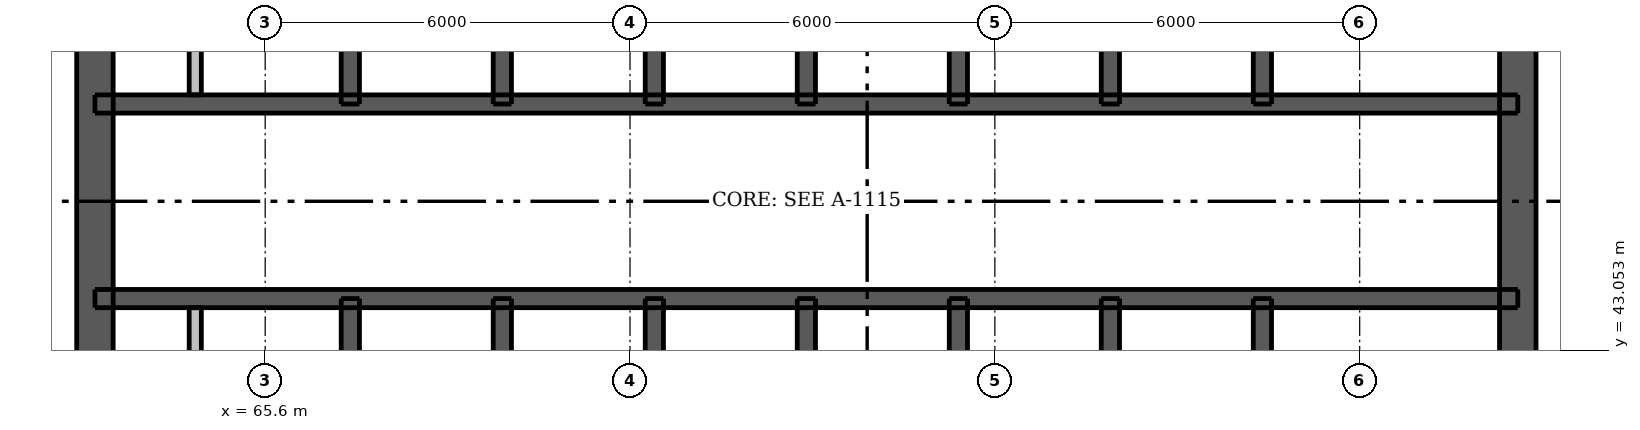
"""IFC4 building model, lengths in metres.
Left out: names, types, materials, properties, quantities, classifications, styles, units other than length and angle.
Written with IfcOpenShell. Run it as: python <this file> out.ifc"""

import sys

from ifc_helpers import new_model, si_unit, direction, frame, frame_2d, origin, place, context, subcontext, project, spatial, rectangle, extrude, element, fill, save


model = new_model("IFC4")
c1 = context("Model", 3, precision=1e-05, world=origin(), true_north=direction((0.0, 1.0)))
c2 = subcontext(c1, "Body", "Model", "MODEL_VIEW")
j1 = project(units=[si_unit("LENGTHUNIT", "METRE"), si_unit("PLANEANGLEUNIT", "RADIAN")], contexts=[c1])
p1 = place(None, origin())
s1 = spatial("IfcSite", under=j1, at=p1, CompositionType="ELEMENT")
p2 = place(p1, origin())
s2 = spatial("IfcBuilding", under=s1, at=p2, CompositionType="ELEMENT")
p3 = place(p2, frame((0.0, 0.0, 229.9)))
s3 = spatial("IfcBuildingStorey", under=s2, at=p3, CompositionType="ELEMENT", Elevation=229.9)
p4 = place(p3, frame((62.8, 33.5, 0.0), z_axis=(0.0, 0.0, 1.0), x_axis=(0.0, 1.0, 0.0)))
e1 = element("IfcWall", 1, at=p4, inside=s3, PredefinedType="SHEAR", context=c2, shape_type="SweptSolid", body=[
    extrude(rectangle(XDim=24.0, YDim=0.6, at=frame_2d((12.0, 0.0))), origin(), (0.0, 0.0, 1.0), 8.75),
])
p5 = place(p4, frame((11.2, 0.0, 0.0)))
e2 = element("IfcOpeningElement", 2, at=p5, cuts=e1, PredefinedType="OPENING", context=c2, shape_type="SweptSolid", body=[
    extrude(rectangle(XDim=1.6, YDim=2.1, at=frame_2d((0.8, 1.05))), frame((0.0, 0.31, 0.0), z_axis=(0.0, -1.0, 0.0), x_axis=(1.0, 0.0, 0.0)), (0.0, 0.0, 1.0), 0.62),
])
p6 = place(p3, frame((86.2, 33.5, 0.0), z_axis=(0.0, 0.0, 1.0), x_axis=(0.0, 1.0, 0.0)))
e3 = element("IfcWall", 3, at=p6, inside=s3, PredefinedType="SHEAR", context=c2, shape_type="SweptSolid", body=[
    extrude(rectangle(XDim=24.0, YDim=0.6, at=frame_2d((12.0, 0.0))), origin(), (0.0, 0.0, 1.0), 8.75),
])
p7 = place(p6, frame((11.2, 0.0, 0.0)))
e4 = element("IfcOpeningElement", 4, at=p7, cuts=e3, PredefinedType="OPENING", context=c2, shape_type="SweptSolid", body=[
    extrude(rectangle(XDim=1.6, YDim=2.1, at=frame_2d((0.8, 1.05))), frame((0.0, 0.31, 0.0), z_axis=(0.0, -1.0, 0.0), x_axis=(1.0, 0.0, 0.0)), (0.0, 0.0, 1.0), 0.62),
])
p8 = place(p3, frame((62.8, 43.9, 0.0), z_axis=(0.0, 0.0, 1.0), x_axis=(1.0, 0.0, 0.0)))
e5 = element("IfcWall", 5, at=p8, inside=s3, PredefinedType="SHEAR", context=c2, shape_type="SweptSolid", body=[
    extrude(rectangle(XDim=23.4, YDim=0.3, at=frame_2d((11.7, 0.0))), origin(), (0.0, 0.0, 1.0), 8.75),
])
p9 = place(p8, frame((0.575, 0.0, 0.0)))
e6 = element("IfcOpeningElement", 6, at=p9, cuts=e5, PredefinedType="OPENING", context=c2, shape_type="SweptSolid", body=[
    extrude(rectangle(XDim=0.8, YDim=2.1, at=frame_2d((0.4, 1.05))), frame((0.0, 0.16, 0.0), z_axis=(0.0, -1.0, 0.0), x_axis=(1.0, 0.0, 0.0)), (0.0, 0.0, 1.0), 0.32),
])
p10 = place(p8, frame((2.4, 0.0, 0.0)))
e7 = element("IfcOpeningElement", 7, at=p10, cuts=e5, PredefinedType="OPENING", context=c2, shape_type="SweptSolid", body=[
    extrude(rectangle(XDim=0.9, YDim=2.1, at=frame_2d((0.45, 1.05))), frame((0.0, 0.16, 0.0), z_axis=(0.0, -1.0, 0.0), x_axis=(1.0, 0.0, 0.0)), (0.0, 0.0, 1.0), 0.32),
])
p11 = place(p8, frame((20.775, 0.0, 0.0)))
e8 = element("IfcOpeningElement", 8, at=p11, cuts=e5, PredefinedType="OPENING", context=c2, shape_type="SweptSolid", body=[
    extrude(rectangle(XDim=0.9, YDim=2.1, at=frame_2d((0.45, 1.05))), frame((0.0, 0.16, 0.0), z_axis=(0.0, -1.0, 0.0), x_axis=(1.0, 0.0, 0.0)), (0.0, 0.0, 1.0), 0.32),
])
p12 = place(p8, frame((5.0, 0.0, 0.0)))
e9 = element("IfcOpeningElement", 9, at=p12, cuts=e5, PredefinedType="OPENING", context=c2, shape_type="SweptSolid", body=[
    extrude(rectangle(XDim=0.9, YDim=2.1, at=frame_2d((0.45, 1.05))), frame((0.0, 0.16, 0.0), z_axis=(0.0, -1.0, 0.0), x_axis=(1.0, 0.0, 0.0)), (0.0, 0.0, 1.0), 0.32),
])
p13 = place(p8, frame((10.0, 0.0, 0.0)))
e10 = element("IfcOpeningElement", 10, at=p13, cuts=e5, PredefinedType="OPENING", context=c2, shape_type="SweptSolid", body=[
    extrude(rectangle(XDim=0.9, YDim=2.1, at=frame_2d((0.45, 1.05))), frame((0.0, 0.16, 0.0), z_axis=(0.0, -1.0, 0.0), x_axis=(1.0, 0.0, 0.0)), (0.0, 0.0, 1.0), 0.32),
])
p14 = place(p8, frame((12.5, 0.0, 0.0)))
e11 = element("IfcOpeningElement", 11, at=p14, cuts=e5, PredefinedType="OPENING", context=c2, shape_type="SweptSolid", body=[
    extrude(rectangle(XDim=0.9, YDim=2.1, at=frame_2d((0.45, 1.05))), frame((0.0, 0.16, 0.0), z_axis=(0.0, -1.0, 0.0), x_axis=(1.0, 0.0, 0.0)), (0.0, 0.0, 1.0), 0.32),
])
p15 = place(p8, frame((17.5, 0.0, 0.0)))
e12 = element("IfcOpeningElement", 12, at=p15, cuts=e5, PredefinedType="OPENING", context=c2, shape_type="SweptSolid", body=[
    extrude(rectangle(XDim=0.9, YDim=2.1, at=frame_2d((0.45, 1.05))), frame((0.0, 0.16, 0.0), z_axis=(0.0, -1.0, 0.0), x_axis=(1.0, 0.0, 0.0)), (0.0, 0.0, 1.0), 0.32),
])
p16 = place(p3, frame((62.8, 47.1, 0.0), z_axis=(0.0, 0.0, 1.0), x_axis=(1.0, 0.0, 0.0)))
e13 = element("IfcWall", 13, at=p16, inside=s3, PredefinedType="SHEAR", context=c2, shape_type="SweptSolid", body=[
    extrude(rectangle(XDim=23.4, YDim=0.3, at=frame_2d((11.7, 0.0))), origin(), (0.0, 0.0, 1.0), 8.75),
])
p17 = place(p16, frame((0.575, 0.0, 0.0)))
e14 = element("IfcOpeningElement", 14, at=p17, cuts=e13, PredefinedType="OPENING", context=c2, shape_type="SweptSolid", body=[
    extrude(rectangle(XDim=0.8, YDim=2.1, at=frame_2d((0.4, 1.05))), frame((0.0, 0.16, 0.0), z_axis=(0.0, -1.0, 0.0), x_axis=(1.0, 0.0, 0.0)), (0.0, 0.0, 1.0), 0.32),
])
p18 = place(p16, frame((2.4, 0.0, 0.0)))
e15 = element("IfcOpeningElement", 15, at=p18, cuts=e13, PredefinedType="OPENING", context=c2, shape_type="SweptSolid", body=[
    extrude(rectangle(XDim=0.9, YDim=2.1, at=frame_2d((0.45, 1.05))), frame((0.0, 0.16, 0.0), z_axis=(0.0, -1.0, 0.0), x_axis=(1.0, 0.0, 0.0)), (0.0, 0.0, 1.0), 0.32),
])
p19 = place(p16, frame((20.775, 0.0, 0.0)))
e16 = element("IfcOpeningElement", 16, at=p19, cuts=e13, PredefinedType="OPENING", context=c2, shape_type="SweptSolid", body=[
    extrude(rectangle(XDim=0.9, YDim=2.1, at=frame_2d((0.45, 1.05))), frame((0.0, 0.16, 0.0), z_axis=(0.0, -1.0, 0.0), x_axis=(1.0, 0.0, 0.0)), (0.0, 0.0, 1.0), 0.32),
])
p20 = place(p16, frame((4.9, 0.0, 0.0)))
e17 = element("IfcOpeningElement", 17, at=p20, cuts=e13, PredefinedType="OPENING", context=c2, shape_type="SweptSolid", body=[
    extrude(rectangle(XDim=1.1, YDim=2.1, at=frame_2d((0.55, 1.05))), frame((0.0, 0.16, 0.0), z_axis=(0.0, -1.0, 0.0), x_axis=(1.0, 0.0, 0.0)), (0.0, 0.0, 1.0), 0.32),
])
p21 = place(p16, frame((7.4, 0.0, 0.0)))
e18 = element("IfcOpeningElement", 18, at=p21, cuts=e13, PredefinedType="OPENING", context=c2, shape_type="SweptSolid", body=[
    extrude(rectangle(XDim=1.1, YDim=2.1, at=frame_2d((0.55, 1.05))), frame((0.0, 0.16, 0.0), z_axis=(0.0, -1.0, 0.0), x_axis=(1.0, 0.0, 0.0)), (0.0, 0.0, 1.0), 0.32),
])
p22 = place(p16, frame((9.9, 0.0, 0.0)))
e19 = element("IfcOpeningElement", 19, at=p22, cuts=e13, PredefinedType="OPENING", context=c2, shape_type="SweptSolid", body=[
    extrude(rectangle(XDim=1.1, YDim=2.1, at=frame_2d((0.55, 1.05))), frame((0.0, 0.16, 0.0), z_axis=(0.0, -1.0, 0.0), x_axis=(1.0, 0.0, 0.0)), (0.0, 0.0, 1.0), 0.32),
])
p23 = place(p16, frame((12.4, 0.0, 0.0)))
e20 = element("IfcOpeningElement", 20, at=p23, cuts=e13, PredefinedType="OPENING", context=c2, shape_type="SweptSolid", body=[
    extrude(rectangle(XDim=1.1, YDim=2.1, at=frame_2d((0.55, 1.05))), frame((0.0, 0.16, 0.0), z_axis=(0.0, -1.0, 0.0), x_axis=(1.0, 0.0, 0.0)), (0.0, 0.0, 1.0), 0.32),
])
p24 = place(p16, frame((14.9, 0.0, 0.0)))
e21 = element("IfcOpeningElement", 21, at=p24, cuts=e13, PredefinedType="OPENING", context=c2, shape_type="SweptSolid", body=[
    extrude(rectangle(XDim=1.1, YDim=2.1, at=frame_2d((0.55, 1.05))), frame((0.0, 0.16, 0.0), z_axis=(0.0, -1.0, 0.0), x_axis=(1.0, 0.0, 0.0)), (0.0, 0.0, 1.0), 0.32),
])
p25 = place(p16, frame((17.4, 0.0, 0.0)))
e22 = element("IfcOpeningElement", 22, at=p25, cuts=e13, PredefinedType="OPENING", context=c2, shape_type="SweptSolid", body=[
    extrude(rectangle(XDim=1.1, YDim=2.1, at=frame_2d((0.55, 1.05))), frame((0.0, 0.16, 0.0), z_axis=(0.0, -1.0, 0.0), x_axis=(1.0, 0.0, 0.0)), (0.0, 0.0, 1.0), 0.32),
])
for number, where, z_axis, x_axis in (
    (23, (67.0, 33.8, 0.0), (0.0, 0.0, 1.0), (0.0, 1.0, 0.0)),
    (24, (67.0, 47.1, 0.0), (0.0, 0.0, 1.0), (0.0, 1.0, 0.0)),
    (25, (82.0, 33.8, 0.0), (0.0, 0.0, 1.0), (0.0, 1.0, 0.0)),
    (26, (82.0, 47.1, 0.0), (0.0, 0.0, 1.0), (0.0, 1.0, 0.0)),
):
    element("IfcWall", number, at=place(p3, frame(where, z_axis=z_axis, x_axis=x_axis)), inside=s3, PredefinedType="SHEAR", context=c2, shape_type="SweptSolid", body=[
        extrude(rectangle(XDim=10.1, YDim=0.3, at=frame_2d((5.05, 0.0))), origin(), (0.0, 0.0, 1.0), 8.75),
    ])
for number, where, z_axis, x_axis in (
    (27, (69.5, 41.0, 0.0), (0.0, 0.0, 1.0), (0.0, 1.0, 0.0)),
    (28, (69.5, 47.1, 0.0), (0.0, 0.0, 1.0), (0.0, 1.0, 0.0)),
    (29, (72.0, 41.0, 0.0), (0.0, 0.0, 1.0), (0.0, 1.0, 0.0)),
    (30, (72.0, 47.1, 0.0), (0.0, 0.0, 1.0), (0.0, 1.0, 0.0)),
    (31, (74.5, 41.0, 0.0), (0.0, 0.0, 1.0), (0.0, 1.0, 0.0)),
    (32, (74.5, 47.1, 0.0), (0.0, 0.0, 1.0), (0.0, 1.0, 0.0)),
    (33, (77.0, 41.0, 0.0), (0.0, 0.0, 1.0), (0.0, 1.0, 0.0)),
    (34, (77.0, 47.1, 0.0), (0.0, 0.0, 1.0), (0.0, 1.0, 0.0)),
    (35, (79.5, 41.0, 0.0), (0.0, 0.0, 1.0), (0.0, 1.0, 0.0)),
    (36, (79.5, 47.1, 0.0), (0.0, 0.0, 1.0), (0.0, 1.0, 0.0)),
):
    element("IfcWall", number, at=place(p3, frame(where, z_axis=z_axis, x_axis=x_axis)), inside=s3, PredefinedType="SHEAR", context=c2, shape_type="SweptSolid", body=[
        extrude(rectangle(XDim=2.9, YDim=0.3, at=frame_2d((1.45, 0.0))), origin(), (0.0, 0.0, 1.0), 8.75),
    ])
for number, where, z_axis, x_axis in (
    (37, (64.45, 41.15, 0.0), (0.0, 0.0, 1.0), (0.0, 1.0, 0.0)),
    (38, (64.45, 47.25, 0.0), (0.0, 0.0, 1.0), (0.0, 1.0, 0.0)),
):
    element("IfcWall", number, at=place(p3, frame(where, z_axis=z_axis, x_axis=x_axis)), inside=s3, PredefinedType="PLUMBINGWALL", context=c2, shape_type="SweptSolid", body=[
        extrude(rectangle(XDim=2.6, YDim=0.2, at=frame_2d((1.3, 0.0))), origin(), (0.0, 0.0, 1.0), 8.75),
    ])
p26 = place(p5, origin())
e39 = element("IfcDoor", 39, at=p26, inside=s3, OperationType="DOUBLE_DOOR_SINGLE_SWING", PredefinedType="DOOR", context=c2, shape_type="SweptSolid", body=[
    extrude(rectangle(XDim=1.6, YDim=2.1, at=frame_2d((0.8, 1.05))), frame((0.0, -0.237, 0.0), z_axis=(0.0, -1.0, 0.0), x_axis=(1.0, 0.0, 0.0)), (0.0, 0.0, 1.0), 0.05),
])
fill(e2, e39)
p27 = place(p7, origin())
e40 = element("IfcDoor", 40, at=p27, inside=s3, OperationType="DOUBLE_DOOR_SINGLE_SWING", PredefinedType="DOOR", context=c2, shape_type="SweptSolid", body=[
    extrude(rectangle(XDim=1.6, YDim=2.1, at=frame_2d((0.8, 1.05))), frame((0.0, 0.288, 0.0), z_axis=(0.0, -1.0, 0.0), x_axis=(1.0, 0.0, 0.0)), (0.0, 0.0, 1.0), 0.05),
])
fill(e4, e40)
p28 = place(p9, origin())
e41 = element("IfcDoor", 41, at=p28, inside=s3, OperationType="SINGLE_SWING_LEFT", PredefinedType="DOOR", context=c2, shape_type="SweptSolid", body=[
    extrude(rectangle(XDim=0.8, YDim=2.1, at=frame_2d((0.4, 1.05))), frame((0.0, -0.087, 0.0), z_axis=(0.0, -1.0, 0.0), x_axis=(1.0, 0.0, 0.0)), (0.0, 0.0, 1.0), 0.05),
])
fill(e6, e41)
p29 = place(p10, origin())
e42 = element("IfcDoor", 42, at=p29, inside=s3, OperationType="SINGLE_SWING_RIGHT", PredefinedType="DOOR", context=c2, shape_type="SweptSolid", body=[
    extrude(rectangle(XDim=0.9, YDim=2.1, at=frame_2d((0.45, 1.05))), frame((0.0, -0.087, 0.0), z_axis=(0.0, -1.0, 0.0), x_axis=(1.0, 0.0, 0.0)), (0.0, 0.0, 1.0), 0.05),
])
fill(e7, e42)
p30 = place(p11, origin())
e43 = element("IfcDoor", 43, at=p30, inside=s3, OperationType="SINGLE_SWING_LEFT", PredefinedType="DOOR", context=c2, shape_type="SweptSolid", body=[
    extrude(rectangle(XDim=0.9, YDim=2.1, at=frame_2d((0.45, 1.05))), frame((0.0, -0.087, 0.0), z_axis=(0.0, -1.0, 0.0), x_axis=(1.0, 0.0, 0.0)), (0.0, 0.0, 1.0), 0.05),
])
fill(e8, e43)
p31 = place(p17, origin())
e44 = element("IfcDoor", 44, at=p31, inside=s3, OperationType="SINGLE_SWING_LEFT", PredefinedType="DOOR", context=c2, shape_type="SweptSolid", body=[
    extrude(rectangle(XDim=0.8, YDim=2.1, at=frame_2d((0.4, 1.05))), frame((0.0, 0.138, 0.0), z_axis=(0.0, -1.0, 0.0), x_axis=(1.0, 0.0, 0.0)), (0.0, 0.0, 1.0), 0.05),
])
fill(e14, e44)
p32 = place(p18, origin())
e45 = element("IfcDoor", 45, at=p32, inside=s3, OperationType="SINGLE_SWING_RIGHT", PredefinedType="DOOR", context=c2, shape_type="SweptSolid", body=[
    extrude(rectangle(XDim=0.9, YDim=2.1, at=frame_2d((0.45, 1.05))), frame((0.0, 0.138, 0.0), z_axis=(0.0, -1.0, 0.0), x_axis=(1.0, 0.0, 0.0)), (0.0, 0.0, 1.0), 0.05),
])
fill(e15, e45)
p33 = place(p19, origin())
e46 = element("IfcDoor", 46, at=p33, inside=s3, OperationType="SINGLE_SWING_LEFT", PredefinedType="DOOR", context=c2, shape_type="SweptSolid", body=[
    extrude(rectangle(XDim=0.9, YDim=2.1, at=frame_2d((0.45, 1.05))), frame((0.0, 0.138, 0.0), z_axis=(0.0, -1.0, 0.0), x_axis=(1.0, 0.0, 0.0)), (0.0, 0.0, 1.0), 0.05),
])
fill(e16, e46)
p34 = place(p12, origin())
e47 = element("IfcDoor", 47, at=p34, inside=s3, OperationType="SINGLE_SWING_RIGHT", PredefinedType="DOOR", context=c2, shape_type="SweptSolid", body=[
    extrude(rectangle(XDim=0.9, YDim=2.1, at=frame_2d((0.45, 1.05))), frame((0.0, -0.087, 0.0), z_axis=(0.0, -1.0, 0.0), x_axis=(1.0, 0.0, 0.0)), (0.0, 0.0, 1.0), 0.05),
])
fill(e9, e47)
p35 = place(p13, origin())
e48 = element("IfcDoor", 48, at=p35, inside=s3, OperationType="SINGLE_SWING_RIGHT", PredefinedType="DOOR", context=c2, shape_type="SweptSolid", body=[
    extrude(rectangle(XDim=0.9, YDim=2.1, at=frame_2d((0.45, 1.05))), frame((0.0, -0.087, 0.0), z_axis=(0.0, -1.0, 0.0), x_axis=(1.0, 0.0, 0.0)), (0.0, 0.0, 1.0), 0.05),
])
fill(e10, e48)
p36 = place(p14, origin())
e49 = element("IfcDoor", 49, at=p36, inside=s3, OperationType="SINGLE_SWING_LEFT", PredefinedType="DOOR", context=c2, shape_type="SweptSolid", body=[
    extrude(rectangle(XDim=0.9, YDim=2.1, at=frame_2d((0.45, 1.05))), frame((0.0, -0.087, 0.0), z_axis=(0.0, -1.0, 0.0), x_axis=(1.0, 0.0, 0.0)), (0.0, 0.0, 1.0), 0.05),
])
fill(e11, e49)
p37 = place(p15, origin())
e50 = element("IfcDoor", 50, at=p37, inside=s3, OperationType="SINGLE_SWING_LEFT", PredefinedType="DOOR", context=c2, shape_type="SweptSolid", body=[
    extrude(rectangle(XDim=0.9, YDim=2.1, at=frame_2d((0.45, 1.05))), frame((0.0, -0.087, 0.0), z_axis=(0.0, -1.0, 0.0), x_axis=(1.0, 0.0, 0.0)), (0.0, 0.0, 1.0), 0.05),
])
fill(e12, e50)
p38 = place(p20, origin())
e51 = element("IfcDoor", 51, at=p38, inside=s3, OperationType="DOUBLE_DOOR_SLIDING", PredefinedType="DOOR", context=c2, shape_type="SweptSolid", body=[
    extrude(rectangle(XDim=1.1, YDim=2.1, at=frame_2d((0.55, 1.05))), frame((0.0, 0.025, 0.0), z_axis=(0.0, -1.0, 0.0), x_axis=(1.0, 0.0, 0.0)), (0.0, 0.0, 1.0), 0.05),
])
fill(e17, e51)
p39 = place(p21, origin())
e52 = element("IfcDoor", 52, at=p39, inside=s3, OperationType="DOUBLE_DOOR_SLIDING", PredefinedType="DOOR", context=c2, shape_type="SweptSolid", body=[
    extrude(rectangle(XDim=1.1, YDim=2.1, at=frame_2d((0.55, 1.05))), frame((0.0, 0.025, 0.0), z_axis=(0.0, -1.0, 0.0), x_axis=(1.0, 0.0, 0.0)), (0.0, 0.0, 1.0), 0.05),
])
fill(e18, e52)
p40 = place(p22, origin())
e53 = element("IfcDoor", 53, at=p40, inside=s3, OperationType="DOUBLE_DOOR_SLIDING", PredefinedType="DOOR", context=c2, shape_type="SweptSolid", body=[
    extrude(rectangle(XDim=1.1, YDim=2.1, at=frame_2d((0.55, 1.05))), frame((0.0, 0.025, 0.0), z_axis=(0.0, -1.0, 0.0), x_axis=(1.0, 0.0, 0.0)), (0.0, 0.0, 1.0), 0.05),
])
fill(e19, e53)
p41 = place(p23, origin())
e54 = element("IfcDoor", 54, at=p41, inside=s3, OperationType="DOUBLE_DOOR_SLIDING", PredefinedType="DOOR", context=c2, shape_type="SweptSolid", body=[
    extrude(rectangle(XDim=1.1, YDim=2.1, at=frame_2d((0.55, 1.05))), frame((0.0, 0.025, 0.0), z_axis=(0.0, -1.0, 0.0), x_axis=(1.0, 0.0, 0.0)), (0.0, 0.0, 1.0), 0.05),
])
fill(e20, e54)
p42 = place(p24, origin())
e55 = element("IfcDoor", 55, at=p42, inside=s3, OperationType="DOUBLE_DOOR_SLIDING", PredefinedType="DOOR", context=c2, shape_type="SweptSolid", body=[
    extrude(rectangle(XDim=1.1, YDim=2.1, at=frame_2d((0.55, 1.05))), frame((0.0, 0.025, 0.0), z_axis=(0.0, -1.0, 0.0), x_axis=(1.0, 0.0, 0.0)), (0.0, 0.0, 1.0), 0.05),
])
fill(e21, e55)
p43 = place(p25, origin())
e56 = element("IfcDoor", 56, at=p43, inside=s3, OperationType="DOUBLE_DOOR_SLIDING", PredefinedType="DOOR", context=c2, shape_type="SweptSolid", body=[
    extrude(rectangle(XDim=1.1, YDim=2.1, at=frame_2d((0.55, 1.05))), frame((0.0, 0.025, 0.0), z_axis=(0.0, -1.0, 0.0), x_axis=(1.0, 0.0, 0.0)), (0.0, 0.0, 1.0), 0.05),
])
fill(e22, e56)
save(model, sys.argv[1])
